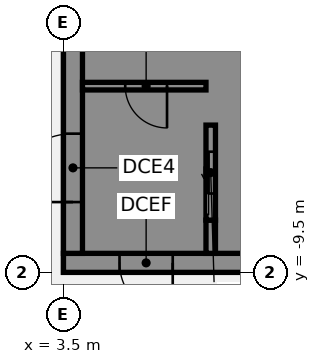
"""IFC4 building model, lengths in metres.
Left out: names, types, materials, properties, quantities, classifications, styles, units other than length and angle.
Written with IfcOpenShell. Run it as: python <this file> out.ifc"""

import sys

from ifc_helpers import new_model, si_unit, direction, frame, frame_2d, origin, place, context, subcontext, project, spatial, polyline, rectangle, outline, extrude, element, fill, save


model = new_model("IFC4")
c1 = context("Model", 3, precision=1e-05, world=origin(), true_north=direction((0.0, 1.0)))
c2 = subcontext(c1, "Body", "Model", "MODEL_VIEW")
j1 = project(units=[si_unit("LENGTHUNIT", "METRE"), si_unit("PLANEANGLEUNIT", "RADIAN")], contexts=[c1])
p1 = place(None, origin())
s1 = spatial("IfcSite", under=j1, at=p1, CompositionType="ELEMENT")
p2 = place(p1, origin())
s2 = spatial("IfcBuilding", under=s1, at=p2, CompositionType="ELEMENT")
p3 = place(p2, frame((0.0, 0.0, 274.8)))
s3 = spatial("IfcBuildingStorey", under=s2, at=p3, CompositionType="ELEMENT", Elevation=274.8)
p4 = place(p3, frame((16.5, -9.25, 0.0), z_axis=(0.0, 0.0, 1.0), x_axis=(-1.0, 0.0, 0.0)))
e1 = element("IfcWall", 1, at=p4, inside=s3, PredefinedType="SHEAR", context=c2, shape_type="SweptSolid", body=[
    extrude(rectangle(XDim=13.0, YDim=0.5, at=frame_2d((6.5, 0.0))), origin(), (0.0, 0.0, 1.0), 3.42),
])
p5 = place(p4, frame((4.15, 0.0, 0.0)))
e2 = element("IfcOpeningElement", 2, at=p5, cuts=e1, PredefinedType="OPENING", context=c2, shape_type="SweptSolid", body=[
    extrude(rectangle(XDim=1.4, YDim=2.1, at=frame_2d((0.7, 1.05))), frame((0.0, 0.26, 0.0), z_axis=(0.0, -1.0, 0.0), x_axis=(1.0, 0.0, 0.0)), (0.0, 0.0, 1.0), 0.52),
])
p6 = place(p4, frame((10.125, 0.0, 0.0)))
e3 = element("IfcOpeningElement", 3, at=p6, cuts=e1, PredefinedType="OPENING", context=c2, shape_type="SweptSolid", body=[
    extrude(rectangle(XDim=1.4, YDim=2.1, at=frame_2d((0.7, 1.05))), frame((0.0, 0.26, 0.0), z_axis=(0.0, -1.0, 0.0), x_axis=(1.0, 0.0, 0.0)), (0.0, 0.0, 1.0), 0.52),
])
p7 = place(p3, origin())
e4 = element("IfcWall", 4, at=p7, inside=s3, PredefinedType="SHEAR", context=c2, shape_type="SweptSolid", body=[
    extrude(outline(polyline([(9.8, -5.375), (7.5, -5.375), (7.5, 2.625), (9.8, 2.625), (9.8, 2.875), (7.5, 2.875), (7.5, 5.375), (9.8, 5.375), (9.8, 5.625), (7.5, 5.625), (7.5, 8.125), (9.8, 8.125), (9.8, 9.0), (7.5, 9.0), (7.25, 9.0), (7.25, -5.625), (7.5, -5.625), (9.8, -5.625), (9.8, -5.375)])), origin(), (0.0, 0.0, 1.0), 3.42),
])
p8 = place(p3, origin())
e5 = element("IfcWall", 5, at=p8, inside=s3, PredefinedType="SHEAR", context=c2, shape_type="SweptSolid", body=[
    extrude(outline(polyline([(7.5, -8.125), (7.5, -9.0), (9.8, -9.0), (9.8, -8.125), (9.8, -5.625), (9.55, -5.625), (9.55, -8.125), (7.5, -8.125)])), origin(), (0.0, 0.0, 1.0), 3.42),
])
p9 = place(p3, frame((7.375, -9.0, 0.0), z_axis=(0.0, 0.0, 1.0), x_axis=(0.0, 1.0, 0.0)))
e6 = element("IfcWall", 6, at=p9, inside=s3, PredefinedType="SHEAR", context=c2, shape_type="SweptSolid", body=[
    extrude(rectangle(XDim=0.875, YDim=0.25, at=frame_2d((0.438, 0.0))), origin(), (0.0, 0.0, 1.0), 3.42),
])
p10 = place(p3, frame((7.375, -8.125, 0.0), z_axis=(0.0, 0.0, 1.0), x_axis=(0.0, 1.0, 0.0)))
e7 = element("IfcWall", 7, at=p10, inside=s3, PredefinedType="SHEAR", context=c2, shape_type="SweptSolid", body=[
    extrude(rectangle(XDim=2.5, YDim=0.25, at=frame_2d((1.25, 0.0))), origin(), (0.0, 0.0, 1.0), 3.42),
])
p11 = place(p10, frame((0.7, 0.0, 0.0)))
e8 = element("IfcOpeningElement", 8, at=p11, cuts=e7, PredefinedType="OPENING", context=c2, shape_type="SweptSolid", body=[
    extrude(rectangle(XDim=1.1, YDim=2.1, at=frame_2d((0.55, 1.05))), frame((0.0, 0.135, 0.0), z_axis=(0.0, -1.0, 0.0), x_axis=(1.0, 0.0, 0.0)), (0.0, 0.0, 1.0), 0.27),
])
p12 = place(p3, frame((3.75, -9.0, 0.0), z_axis=(0.0, 0.0, 1.0), x_axis=(0.0, 1.0, 0.0)))
e9 = element("IfcWall", 9, at=p12, inside=s3, PredefinedType="SHEAR", context=c2, shape_type="SweptSolid", body=[
    extrude(rectangle(XDim=18.0, YDim=0.5, at=frame_2d((9.0, 0.0))), origin(), (0.0, 0.0, 1.0), 3.42),
])
p13 = place(p12, frame((1.35, 0.0, 0.0)))
e10 = element("IfcOpeningElement", 10, at=p13, cuts=e9, PredefinedType="OPENING", context=c2, shape_type="SweptSolid", body=[
    extrude(rectangle(XDim=1.8, YDim=2.1, at=frame_2d((0.9, 1.05))), frame((0.0, 0.26, 0.0), z_axis=(0.0, -1.0, 0.0), x_axis=(1.0, 0.0, 0.0)), (0.0, 0.0, 1.0), 0.52),
])
p14 = place(p12, frame((12.75, 0.0, 0.0)))
e11 = element("IfcOpeningElement", 11, at=p14, cuts=e9, PredefinedType="OPENING", context=c2, shape_type="SweptSolid", body=[
    extrude(rectangle(XDim=1.0, YDim=2.1, at=frame_2d((0.5, 1.05))), frame((0.0, 0.26, 0.0), z_axis=(0.0, -1.0, 0.0), x_axis=(1.0, 0.0, 0.0)), (0.0, 0.0, 1.0), 0.52),
])
p15 = place(p12, frame((16.274, 0.0, 0.0)))
e12 = element("IfcOpeningElement", 12, at=p15, cuts=e9, PredefinedType="OPENING", context=c2, shape_type="SweptSolid", body=[
    extrude(rectangle(XDim=1.0, YDim=2.1, at=frame_2d((0.5, 1.05))), frame((0.0, 0.26, 0.0), z_axis=(0.0, -1.0, 0.0), x_axis=(1.0, 0.0, 0.0)), (0.0, 0.0, 1.0), 0.52),
])
p16 = place(p3, frame((7.25, -4.6, 0.0), z_axis=(0.0, 0.0, 1.0), x_axis=(-1.0, 0.0, 0.0)))
e13 = element("IfcWall", 13, at=p16, inside=s3, PredefinedType="SHEAR", context=c2, shape_type="SweptSolid", body=[
    extrude(rectangle(XDim=3.25, YDim=0.2, at=frame_2d((1.625, 0.0))), origin(), (0.0, 0.0, 1.0), 3.42),
])
p17 = place(p16, frame((1.025, 0.0, 0.0)))
e14 = element("IfcOpeningElement", 14, at=p17, cuts=e13, PredefinedType="OPENING", context=c2, shape_type="SweptSolid", body=[
    extrude(rectangle(XDim=1.1, YDim=2.1, at=frame_2d((0.55, 1.05))), frame((0.0, 0.11, 0.0), z_axis=(0.0, -1.0, 0.0), x_axis=(1.0, 0.0, 0.0)), (0.0, 0.0, 1.0), 0.22),
])
p18 = place(p6, origin())
e15 = element("IfcDoor", 15, at=p18, inside=s3, OperationType="SINGLE_SWING_LEFT", PredefinedType="DOOR", context=c2, shape_type="SweptSolid", body=[
    extrude(rectangle(XDim=1.4, YDim=2.1, at=frame_2d((0.7, 1.05))), frame((0.0, 0.025, 0.0), z_axis=(0.0, -1.0, 0.0), x_axis=(1.0, 0.0, 0.0)), (0.0, 0.0, 1.0), 0.05),
])
fill(e3, e15)
p19 = place(p13, origin())
e16 = element("IfcDoor", 16, at=p19, inside=s3, OperationType="SINGLE_SWING_LEFT", PredefinedType="DOOR", context=c2, shape_type="SweptSolid", body=[
    extrude(rectangle(XDim=1.8, YDim=2.1, at=frame_2d((0.9, 1.05))), frame((0.0, 0.025, 0.0), z_axis=(0.0, -1.0, 0.0), x_axis=(1.0, 0.0, 0.0)), (0.0, 0.0, 1.0), 0.05),
])
fill(e10, e16)
p20 = place(p17, origin())
e17 = element("IfcDoor", 17, at=p20, inside=s3, OperationType="SINGLE_SWING_LEFT", PredefinedType="DOOR", context=c2, shape_type="SweptSolid", body=[
    extrude(rectangle(XDim=1.1, YDim=2.1, at=frame_2d((0.55, 1.05))), frame((0.0, 0.025, 0.0), z_axis=(0.0, -1.0, 0.0), x_axis=(1.0, 0.0, 0.0)), (0.0, 0.0, 1.0), 0.05),
])
fill(e14, e17)
p21 = place(p11, origin())
e18 = element("IfcDoor", 18, at=p21, inside=s3, OperationType="SLIDING_TO_LEFT", PredefinedType="DOOR", context=c2, shape_type="SweptSolid", body=[
    extrude(rectangle(XDim=1.1, YDim=2.1, at=frame_2d((0.55, 1.05))), frame((0.0, 0.025, 0.0), z_axis=(0.0, -1.0, 0.0), x_axis=(1.0, 0.0, 0.0)), (0.0, 0.0, 1.0), 0.05),
])
fill(e8, e18)
save(model, sys.argv[1])
